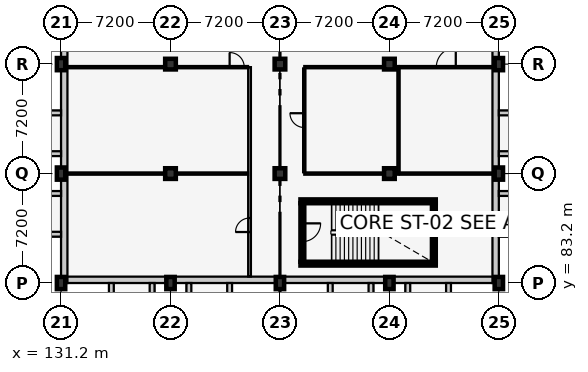
"""IFC4 building model, lengths in metres.
Left out: names, types, materials, properties, quantities, classifications, styles, units other than length and angle.
Written with IfcOpenShell. Run it as: python <this file> out.ifc"""

import sys

from ifc_helpers import new_model, si_unit, direction, frame, frame_2d, origin, origin_2d, place, context, subcontext, project, spatial, rectangle, extrude, element, fill, save


model = new_model("IFC4")
c1 = context("Model", 3, precision=1e-05, world=origin(), true_north=direction((0.0, 1.0)))
c2 = subcontext(c1, "Body", "Model", "MODEL_VIEW")
j1 = project(units=[si_unit("LENGTHUNIT", "METRE"), si_unit("PLANEANGLEUNIT", "RADIAN")], contexts=[c1])
p1 = place(None, origin())
s1 = spatial("IfcSite", under=j1, at=p1, CompositionType="ELEMENT")
p2 = place(p1, origin())
s2 = spatial("IfcBuilding", under=s1, at=p2, CompositionType="ELEMENT")
p3 = place(p2, frame((0.0, 0.0, 9.6)))
s3 = spatial("IfcBuildingStorey", under=s2, at=p3, CompositionType="ELEMENT", Elevation=9.6)
for number, where, z_axis, x_axis in (
    (1, (131.2, 83.2, 0.0), (0.0, 0.0, 1.0), (1.0, 0.0, 0.0)),
    (2, (131.2, 90.4, 0.0), (0.0, 0.0, 1.0), (1.0, 0.0, 0.0)),
    (3, (131.2, 97.6, 0.0), (0.0, 0.0, 1.0), (1.0, 0.0, 0.0)),
    (4, (138.4, 83.2, 0.0), (0.0, 0.0, 1.0), (1.0, 0.0, 0.0)),
):
    element("IfcColumn", number, at=place(p3, frame(where, z_axis=z_axis, x_axis=x_axis)), inside=s3, PredefinedType="COLUMN", context=c2, shape_type="SweptSolid", body=[
        extrude(rectangle(XDim=0.55, YDim=0.8, at=origin_2d()), origin(), (0.0, 0.0, 1.0), 4.2),
    ])
for number, where, z_axis, x_axis in (
    (5, (138.4, 90.4, 0.0), (0.0, 0.0, 1.0), (1.0, 0.0, 0.0)),
    (6, (138.4, 97.6, 0.0), (0.0, 0.0, 1.0), (1.0, 0.0, 0.0)),
):
    element("IfcColumn", number, at=place(p3, frame(where, z_axis=z_axis, x_axis=x_axis)), inside=s3, PredefinedType="COLUMN", context=c2, shape_type="SweptSolid", body=[
        extrude(rectangle(XDim=0.7, YDim=0.7, at=origin_2d()), origin(), (0.0, 0.0, 1.0), 4.2),
    ])
p4 = place(p3, frame((145.6, 83.2, 0.0), z_axis=(0.0, 0.0, 1.0), x_axis=(1.0, 0.0, 0.0)))
e7 = element("IfcColumn", 7, at=p4, inside=s3, PredefinedType="COLUMN", context=c2, shape_type="SweptSolid", body=[
    extrude(rectangle(XDim=0.55, YDim=0.8, at=origin_2d()), origin(), (0.0, 0.0, 1.0), 4.2),
])
for number, where, z_axis, x_axis in (
    (8, (145.6, 90.4, 0.0), (0.0, 0.0, 1.0), (1.0, 0.0, 0.0)),
    (9, (145.6, 97.6, 0.0), (0.0, 0.0, 1.0), (1.0, 0.0, 0.0)),
):
    element("IfcColumn", number, at=place(p3, frame(where, z_axis=z_axis, x_axis=x_axis)), inside=s3, PredefinedType="COLUMN", context=c2, shape_type="SweptSolid", body=[
        extrude(rectangle(XDim=0.7, YDim=0.7, at=origin_2d()), origin(), (0.0, 0.0, 1.0), 4.2),
    ])
p5 = place(p3, frame((152.8, 83.2, 0.0), z_axis=(0.0, 0.0, 1.0), x_axis=(1.0, 0.0, 0.0)))
e10 = element("IfcColumn", 10, at=p5, inside=s3, PredefinedType="COLUMN", context=c2, shape_type="SweptSolid", body=[
    extrude(rectangle(XDim=0.55, YDim=0.8, at=origin_2d()), origin(), (0.0, 0.0, 1.0), 4.2),
])
for number, where, z_axis, x_axis in (
    (11, (152.8, 90.4, 0.0), (0.0, 0.0, 1.0), (1.0, 0.0, 0.0)),
    (12, (152.8, 97.6, 0.0), (0.0, 0.0, 1.0), (1.0, 0.0, 0.0)),
):
    element("IfcColumn", number, at=place(p3, frame(where, z_axis=z_axis, x_axis=x_axis)), inside=s3, PredefinedType="COLUMN", context=c2, shape_type="SweptSolid", body=[
        extrude(rectangle(XDim=0.7, YDim=0.7, at=origin_2d()), origin(), (0.0, 0.0, 1.0), 4.2),
    ])
for number, where, z_axis, x_axis in (
    (13, (160.0, 83.2, 0.0), (0.0, 0.0, 1.0), (1.0, 0.0, 0.0)),
    (14, (160.0, 90.4, 0.0), (0.0, 0.0, 1.0), (1.0, 0.0, 0.0)),
    (15, (160.0, 97.6, 0.0), (0.0, 0.0, 1.0), (1.0, 0.0, 0.0)),
):
    element("IfcColumn", number, at=place(p3, frame(where, z_axis=z_axis, x_axis=x_axis)), inside=s3, PredefinedType="COLUMN", context=c2, shape_type="SweptSolid", body=[
        extrude(rectangle(XDim=0.55, YDim=0.8, at=origin_2d()), origin(), (0.0, 0.0, 1.0), 4.2),
    ])
p6 = place(p3, frame((160.0, 83.41, 0.0), z_axis=(0.0, 0.0, 1.0), x_axis=(-1.0, 0.0, 0.0)))
e16 = element("IfcWall", 16, at=p6, inside=s3, PredefinedType="SOLIDWALL", context=c2, shape_type="SweptSolid", body=[
    extrude(rectangle(XDim=28.8, YDim=0.42, at=frame_2d((14.4, 0.0))), origin(), (0.0, 0.0, 1.0), 3.245),
])
p7 = place(p3, frame((134.51, 83.2, 0.0), z_axis=(0.0, 0.0, 1.0), x_axis=(0.0, -1.0, 0.0)))
e17 = element("IfcWall", 17, at=p7, inside=s3, PredefinedType="SOLIDWALL", context=c2, shape_type="SweptSolid", body=[
    extrude(rectangle(XDim=1.35, YDim=0.32, at=frame_2d((0.675, 0.0))), origin(), (0.0, 0.0, 1.0), 3.93),
])
for number, where, z_axis, x_axis in (
    (18, (137.19, 83.2, 0.0), (0.0, 0.0, 1.0), (0.0, -1.0, 0.0)),
    (19, (139.61, 83.2, 0.0), (0.0, 0.0, 1.0), (0.0, -1.0, 0.0)),
):
    element("IfcWall", number, at=place(p3, frame(where, z_axis=z_axis, x_axis=x_axis)), inside=s3, PredefinedType="SOLIDWALL", context=c2, shape_type="SweptSolid", body=[
        extrude(rectangle(XDim=1.793, YDim=0.32, at=frame_2d((0.896, 0.0))), origin(), (0.0, 0.0, 1.0), 3.93),
    ])
for number, where, z_axis, x_axis in (
    (20, (142.29, 83.2, 0.0), (0.0, 0.0, 1.0), (0.0, -1.0, 0.0)),
    (21, (148.91, 83.2, 0.0), (0.0, 0.0, 1.0), (0.0, -1.0, 0.0)),
):
    element("IfcWall", number, at=place(p3, frame(where, z_axis=z_axis, x_axis=x_axis)), inside=s3, PredefinedType="SOLIDWALL", context=c2, shape_type="SweptSolid", body=[
        extrude(rectangle(XDim=1.35, YDim=0.32, at=frame_2d((0.675, 0.0))), origin(), (0.0, 0.0, 1.0), 3.93),
    ])
for number, where, z_axis, x_axis in (
    (22, (151.59, 83.2, 0.0), (0.0, 0.0, 1.0), (0.0, -1.0, 0.0)),
    (23, (154.01, 83.2, 0.0), (0.0, 0.0, 1.0), (0.0, -1.0, 0.0)),
):
    element("IfcWall", number, at=place(p3, frame(where, z_axis=z_axis, x_axis=x_axis)), inside=s3, PredefinedType="SOLIDWALL", context=c2, shape_type="SweptSolid", body=[
        extrude(rectangle(XDim=1.793, YDim=0.32, at=frame_2d((0.896, 0.0))), origin(), (0.0, 0.0, 1.0), 3.93),
    ])
p8 = place(p3, frame((156.69, 83.2, 0.0), z_axis=(0.0, 0.0, 1.0), x_axis=(0.0, -1.0, 0.0)))
e24 = element("IfcWall", 24, at=p8, inside=s3, PredefinedType="SOLIDWALL", context=c2, shape_type="SweptSolid", body=[
    extrude(rectangle(XDim=1.35, YDim=0.32, at=frame_2d((0.675, 0.0))), origin(), (0.0, 0.0, 1.0), 3.93),
])
p9 = place(p3, frame((159.79, 112.0, 0.0), z_axis=(0.0, 0.0, 1.0), x_axis=(0.0, -1.0, 0.0)))
e25 = element("IfcWall", 25, at=p9, inside=s3, PredefinedType="SOLIDWALL", context=c2, shape_type="SweptSolid", body=[
    extrude(rectangle(XDim=28.8, YDim=0.42, at=frame_2d((14.4, 0.0))), origin(), (0.0, 0.0, 1.0), 3.345),
])
p10 = place(p3, frame((160.0, 86.41, 0.0), z_axis=(0.0, 0.0, 1.0), x_axis=(1.0, 0.0, 0.0)))
e26 = element("IfcWall", 26, at=p10, inside=s3, PredefinedType="SOLIDWALL", context=c2, shape_type="SweptSolid", body=[
    extrude(rectangle(XDim=1.793, YDim=0.32, at=frame_2d((0.896, 0.0))), origin(), (0.0, 0.0, 1.0), 3.93),
])
for number, where, z_axis, x_axis in (
    (27, (160.0, 89.09, 0.0), (0.0, 0.0, 1.0), (1.0, 0.0, 0.0)),
    (28, (160.0, 91.71, 0.0), (0.0, 0.0, 1.0), (1.0, 0.0, 0.0)),
):
    element("IfcWall", number, at=place(p3, frame(where, z_axis=z_axis, x_axis=x_axis)), inside=s3, PredefinedType="SOLIDWALL", context=c2, shape_type="SweptSolid", body=[
        extrude(rectangle(XDim=1.35, YDim=0.32, at=frame_2d((0.675, 0.0))), origin(), (0.0, 0.0, 1.0), 3.93),
    ])
p11 = place(p3, frame((160.0, 94.39, 0.0), z_axis=(0.0, 0.0, 1.0), x_axis=(1.0, 0.0, 0.0)))
e29 = element("IfcWall", 29, at=p11, inside=s3, PredefinedType="SOLIDWALL", context=c2, shape_type="SweptSolid", body=[
    extrude(rectangle(XDim=1.793, YDim=0.32, at=frame_2d((0.896, 0.0))), origin(), (0.0, 0.0, 1.0), 3.93),
])
p12 = place(p3, frame((131.41, 83.2, 0.0), z_axis=(0.0, 0.0, 1.0), x_axis=(0.0, 1.0, 0.0)))
e30 = element("IfcWall", 30, at=p12, inside=s3, PredefinedType="SOLIDWALL", context=c2, shape_type="SweptSolid", body=[
    extrude(rectangle(XDim=28.8, YDim=0.42, at=frame_2d((14.4, 0.0))), origin(), (0.0, 0.0, 1.0), 3.345),
])
p13 = place(p3, frame((131.2, 86.41, 0.0), z_axis=(0.0, 0.0, 1.0), x_axis=(-1.0, 0.0, 0.0)))
e31 = element("IfcWall", 31, at=p13, inside=s3, PredefinedType="SOLIDWALL", context=c2, shape_type="SweptSolid", body=[
    extrude(rectangle(XDim=1.35, YDim=0.32, at=frame_2d((0.675, 0.0))), origin(), (0.0, 0.0, 1.0), 3.93),
])
for number, where, z_axis, x_axis in (
    (32, (131.2, 89.09, 0.0), (0.0, 0.0, 1.0), (-1.0, 0.0, 0.0)),
    (33, (131.2, 91.71, 0.0), (0.0, 0.0, 1.0), (-1.0, 0.0, 0.0)),
):
    element("IfcWall", number, at=place(p3, frame(where, z_axis=z_axis, x_axis=x_axis)), inside=s3, PredefinedType="SOLIDWALL", context=c2, shape_type="SweptSolid", body=[
        extrude(rectangle(XDim=1.793, YDim=0.32, at=frame_2d((0.896, 0.0))), origin(), (0.0, 0.0, 1.0), 3.93),
    ])
p14 = place(p3, frame((131.2, 94.39, 0.0), z_axis=(0.0, 0.0, 1.0), x_axis=(-1.0, 0.0, 0.0)))
e34 = element("IfcWall", 34, at=p14, inside=s3, PredefinedType="SOLIDWALL", context=c2, shape_type="SweptSolid", body=[
    extrude(rectangle(XDim=1.35, YDim=0.32, at=frame_2d((0.675, 0.0))), origin(), (0.0, 0.0, 1.0), 3.93),
])
for number, where, z_axis, x_axis in (
    (35, (146.95, 84.475, 0.0), (0.0, 0.0, 1.0), (1.0, 0.0, 0.0)),
    (36, (155.85, 88.575, 0.0), (0.0, 0.0, 1.0), (-1.0, 0.0, 0.0)),
):
    element("IfcWall", number, at=place(p3, frame(where, z_axis=z_axis, x_axis=x_axis)), inside=s3, PredefinedType="SHEAR", context=c2, shape_type="SweptSolid", body=[
        extrude(rectangle(XDim=8.9, YDim=0.25, at=frame_2d((4.45, 0.0))), origin(), (0.0, 0.0, 1.0), 3.95),
    ])
p15 = place(p3, frame((147.075, 88.45, 0.0), z_axis=(0.0, 0.0, 1.0), x_axis=(0.0, -1.0, 0.0)))
e37 = element("IfcWall", 37, at=p15, inside=s3, PredefinedType="SHEAR", context=c2, shape_type="SweptSolid", body=[
    extrude(rectangle(XDim=3.85, YDim=0.25, at=frame_2d((1.925, 0.0))), origin(), (0.0, 0.0, 1.0), 3.95),
])
p16 = place(p15, frame((1.325, 0.0, 0.0)))
e38 = element("IfcOpeningElement", 38, at=p16, cuts=e37, PredefinedType="OPENING", context=c2, shape_type="SweptSolid", body=[
    extrude(rectangle(XDim=1.2, YDim=2.15, at=frame_2d((0.6, 1.075))), frame((0.0, 0.137, 0.0), z_axis=(0.0, -1.0, 0.0), x_axis=(1.0, 0.0, 0.0)), (0.0, 0.0, 1.0), 0.274),
])
p17 = place(p3, frame((155.725, 84.6, 0.0), z_axis=(0.0, 0.0, 1.0), x_axis=(0.0, 1.0, 0.0)))
e39 = element("IfcWall", 39, at=p17, inside=s3, PredefinedType="SHEAR", context=c2, shape_type="SweptSolid", body=[
    extrude(rectangle(XDim=3.85, YDim=0.25, at=frame_2d((1.925, 0.0))), origin(), (0.0, 0.0, 1.0), 3.95),
])
p18 = place(p3, frame((143.6, 83.63, 0.0), z_axis=(0.0, 0.0, 1.0), x_axis=(0.0, 1.0, 0.0)))
e40 = element("IfcWall", 40, at=p18, inside=s3, PredefinedType="PARTITIONING", context=c2, shape_type="SweptSolid", body=[
    extrude(rectangle(XDim=13.77, YDim=0.18, at=frame_2d((6.885, 0.0))), origin(), (0.0, 0.0, 1.0), 3.95),
])
p19 = place(p18, frame((2.925, 0.0, 0.0)))
e41 = element("IfcOpeningElement", 41, at=p19, cuts=e40, PredefinedType="OPENING", context=c2, shape_type="SweptSolid", body=[
    extrude(rectangle(XDim=0.92, YDim=2.08, at=frame_2d((0.46, 1.04))), frame((0.0, 0.102, 0.0), z_axis=(0.0, -1.0, 0.0), x_axis=(1.0, 0.0, 0.0)), (0.0, 0.0, 1.0), 0.204),
])
p20 = place(p3, frame((131.63, 90.4, 0.0), z_axis=(0.0, 0.0, 1.0), x_axis=(1.0, 0.0, 0.0)))
e42 = element("IfcWall", 42, at=p20, inside=s3, PredefinedType="PARTITIONING", context=c2, shape_type="SweptSolid", body=[
    extrude(rectangle(XDim=11.87, YDim=0.15, at=frame_2d((5.935, 0.0))), origin(), (0.0, 0.0, 1.0), 3.225),
])
p21 = place(p3, frame((131.63, 97.4, 0.0), z_axis=(0.0, 0.0, 1.0), x_axis=(1.0, 0.0, 0.0)))
e43 = element("IfcWall", 43, at=p21, inside=s3, PredefinedType="PARTITIONING", context=c2, shape_type="SweptSolid", body=[
    extrude(rectangle(XDim=11.87, YDim=0.15, at=frame_2d((5.935, 0.0))), origin(), (0.0, 0.0, 1.0), 3.225),
])
p22 = place(p21, frame((10.66, 0.0, 0.0)))
e44 = element("IfcOpeningElement", 44, at=p22, cuts=e43, PredefinedType="OPENING", context=c2, shape_type="SweptSolid", body=[
    extrude(rectangle(XDim=0.96, YDim=2.1, at=frame_2d((0.48, 1.05))), frame((0.0, 0.087, 0.0), z_axis=(0.0, -1.0, 0.0), x_axis=(1.0, 0.0, 0.0)), (0.0, 0.0, 1.0), 0.174),
])
for number, where, z_axis, x_axis in (
    (45, (147.2, 90.4, 0.0), (0.0, 0.0, 1.0), (1.0, 0.0, 0.0)),
    (46, (147.2, 97.4, 0.0), (0.0, 0.0, 1.0), (1.0, 0.0, 0.0)),
):
    element("IfcWall", number, at=place(p3, frame(where, z_axis=z_axis, x_axis=x_axis)), inside=s3, PredefinedType="PARTITIONING", context=c2, shape_type="SweptSolid", body=[
        extrude(rectangle(XDim=6.2, YDim=0.15, at=frame_2d((3.1, 0.0))), origin(), (0.0, 0.0, 1.0), 3.075),
    ])
p23 = place(p3, frame((147.2, 90.485, 0.0), z_axis=(0.0, 0.0, 1.0), x_axis=(0.0, 1.0, 0.0)))
e47 = element("IfcWall", 47, at=p23, inside=s3, PredefinedType="PARTITIONING", context=c2, shape_type="SweptSolid", body=[
    extrude(rectangle(XDim=6.83, YDim=0.15, at=frame_2d((3.415, 0.0))), origin(), (0.0, 0.0, 1.0), 3.95),
])
p24 = place(p23, frame((2.945, 0.0, 0.0)))
e48 = element("IfcOpeningElement", 48, at=p24, cuts=e47, PredefinedType="OPENING", context=c2, shape_type="SweptSolid", body=[
    extrude(rectangle(XDim=0.94, YDim=2.1, at=frame_2d((0.47, 1.05))), frame((0.0, 0.087, 0.0), z_axis=(0.0, -1.0, 0.0), x_axis=(1.0, 0.0, 0.0)), (0.0, 0.0, 1.0), 0.174),
])
p25 = place(p3, frame((153.4, 90.485, 0.0), z_axis=(0.0, 0.0, 1.0), x_axis=(0.0, 1.0, 0.0)))
e49 = element("IfcWall", 49, at=p25, inside=s3, PredefinedType="PARTITIONING", context=c2, shape_type="SweptSolid", body=[
    extrude(rectangle(XDim=6.83, YDim=0.15, at=frame_2d((3.415, 0.0))), origin(), (0.0, 0.0, 1.0), 3.95),
])
p26 = place(p3, frame((153.485, 90.4, 0.0), z_axis=(0.0, 0.0, 1.0), x_axis=(1.0, 0.0, 0.0)))
e50 = element("IfcWall", 50, at=p26, inside=s3, PredefinedType="PARTITIONING", context=c2, shape_type="SweptSolid", body=[
    extrude(rectangle(XDim=6.085, YDim=0.15, at=frame_2d((3.042, 0.0))), origin(), (0.0, 0.0, 1.0), 3.075),
])
p27 = place(p3, frame((153.485, 97.4, 0.0), z_axis=(0.0, 0.0, 1.0), x_axis=(1.0, 0.0, 0.0)))
e51 = element("IfcWall", 51, at=p27, inside=s3, PredefinedType="PARTITIONING", context=c2, shape_type="SweptSolid", body=[
    extrude(rectangle(XDim=6.085, YDim=0.15, at=frame_2d((3.042, 0.0))), origin(), (0.0, 0.0, 1.0), 3.075),
])
p28 = place(p27, frame((2.403, 0.0, 0.0)))
e52 = element("IfcOpeningElement", 52, at=p28, cuts=e51, PredefinedType="OPENING", context=c2, shape_type="SweptSolid", body=[
    extrude(rectangle(XDim=1.28, YDim=2.2, at=frame_2d((0.64, 1.1))), frame((0.0, 0.087, 0.0), z_axis=(0.0, -1.0, 0.0), x_axis=(1.0, 0.0, 0.0)), (0.0, 0.0, 1.0), 0.174),
])
p29 = place(p16, origin())
e53 = element("IfcDoor", 53, at=p29, inside=s3, OperationType="SINGLE_SWING_LEFT", PredefinedType="DOOR", context=c2, shape_type="SweptSolid", body=[
    extrude(rectangle(XDim=1.2, YDim=2.15, at=frame_2d((0.6, 1.075))), frame((0.0, 0.025, 0.0), z_axis=(0.0, -1.0, 0.0), x_axis=(1.0, 0.0, 0.0)), (0.0, 0.0, 1.0), 0.05),
])
fill(e38, e53)
p30 = place(p22, origin())
e54 = element("IfcDoor", 54, at=p30, inside=s3, OperationType="SINGLE_SWING_LEFT", PredefinedType="DOOR", context=c2, shape_type="SweptSolid", body=[
    extrude(rectangle(XDim=0.96, YDim=2.1, at=frame_2d((0.48, 1.05))), frame((0.0, 0.025, 0.0), z_axis=(0.0, -1.0, 0.0), x_axis=(1.0, 0.0, 0.0)), (0.0, 0.0, 1.0), 0.05),
])
fill(e44, e54)
p31 = place(p24, origin())
e55 = element("IfcDoor", 55, at=p31, inside=s3, OperationType="SINGLE_SWING_RIGHT", PredefinedType="DOOR", context=c2, shape_type="SweptSolid", body=[
    extrude(rectangle(XDim=0.94, YDim=2.1, at=frame_2d((0.47, 1.05))), frame((0.0, 0.025, 0.0), z_axis=(0.0, -1.0, 0.0), x_axis=(1.0, 0.0, 0.0)), (0.0, 0.0, 1.0), 0.05),
])
fill(e48, e55)
p32 = place(p19, origin())
e56 = element("IfcDoor", 56, at=p32, inside=s3, OperationType="SINGLE_SWING_LEFT", PredefinedType="DOOR", context=c2, shape_type="SweptSolid", body=[
    extrude(rectangle(XDim=0.92, YDim=2.08, at=frame_2d((0.46, 1.04))), frame((0.0, 0.025, 0.0), z_axis=(0.0, -1.0, 0.0), x_axis=(1.0, 0.0, 0.0)), (0.0, 0.0, 1.0), 0.05),
])
fill(e41, e56)
p33 = place(p28, origin())
e57 = element("IfcDoor", 57, at=p33, inside=s3, OperationType="SINGLE_SWING_RIGHT", PredefinedType="DOOR", context=c2, shape_type="SweptSolid", body=[
    extrude(rectangle(XDim=1.28, YDim=2.2, at=frame_2d((0.64, 1.1))), frame((0.0, 0.025, 0.0), z_axis=(0.0, -1.0, 0.0), x_axis=(1.0, 0.0, 0.0)), (0.0, 0.0, 1.0), 0.05),
])
fill(e52, e57)
save(model, sys.argv[1])
